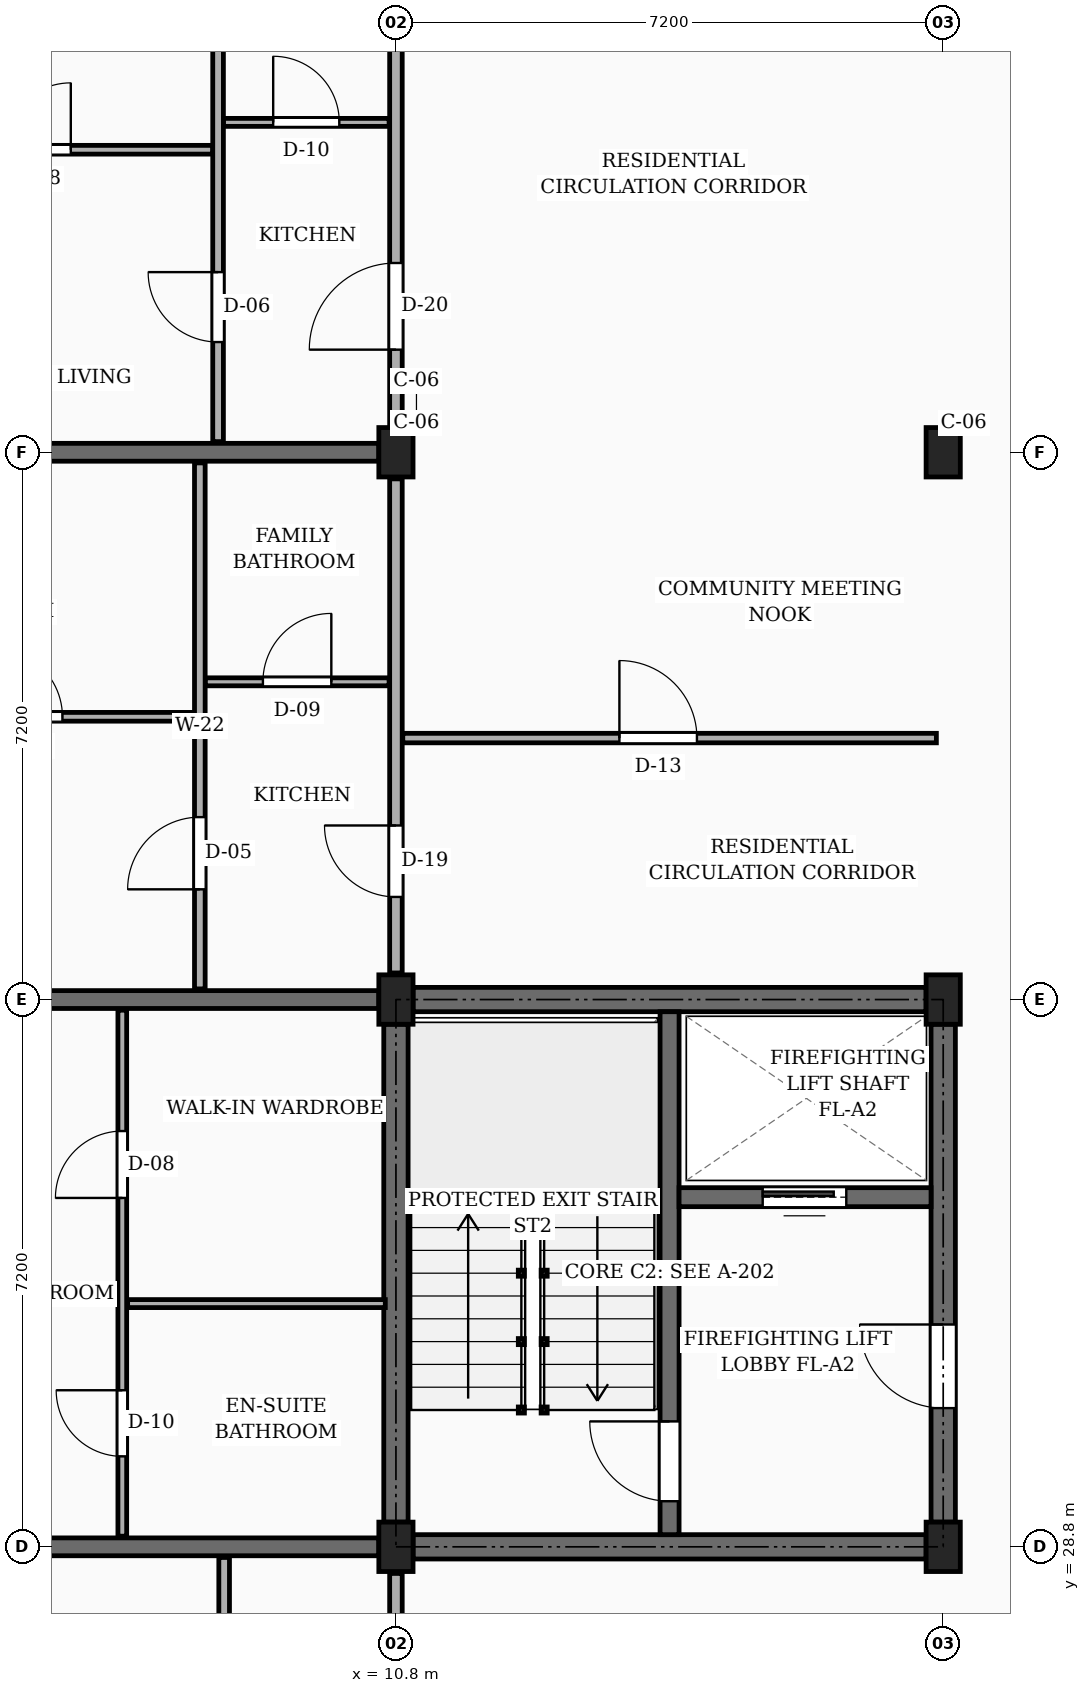
"""IFC4 building model, lengths in metres.
Left out: names, types, materials, properties, quantities, classifications, styles, units other than length and angle.
Written with IfcOpenShell. Run it as: python <this file> out.ifc"""

import sys

from ifc_helpers import new_model, si_unit, direction, frame, frame_2d, origin, origin_2d, place, context, subcontext, project, spatial, rectangle, extrude, element, fill, save


model = new_model("IFC4")
c1 = context("Model", 3, precision=1e-05, world=origin(), true_north=direction((0.0, 1.0)))
c2 = subcontext(c1, "Body", "Model", "MODEL_VIEW")
j1 = project(units=[si_unit("LENGTHUNIT", "METRE"), si_unit("PLANEANGLEUNIT", "RADIAN")], contexts=[c1])
p1 = place(None, origin())
s1 = spatial("IfcSite", under=j1, at=p1, CompositionType="ELEMENT")
p2 = place(p1, origin())
s2 = spatial("IfcBuilding", under=s1, at=p2, CompositionType="ELEMENT")
p3 = place(p2, frame((0.0, 0.0, 13.95)))
s3 = spatial("IfcBuildingStorey", under=s2, at=p3, CompositionType="ELEMENT", Elevation=13.95)
for number, where, z_axis, x_axis in (
    (1, (10.8, 28.8, 0.0), (0.0, 0.0, 1.0), (1.0, 0.0, 0.0)),
    (2, (10.8, 36.0, 0.0), (0.0, 0.0, 1.0), (1.0, 0.0, 0.0)),
    (3, (10.8, 43.2, 0.0), (0.0, 0.0, 1.0), (1.0, 0.0, 0.0)),
    (4, (18.0, 28.8, 0.0), (0.0, 0.0, 1.0), (1.0, 0.0, 0.0)),
    (5, (18.0, 36.0, 0.0), (0.0, 0.0, 1.0), (1.0, 0.0, 0.0)),
    (6, (18.0, 43.2, 0.0), (0.0, 0.0, 1.0), (1.0, 0.0, 0.0)),
):
    element("IfcColumn", number, at=place(p3, frame(where, z_axis=z_axis, x_axis=x_axis)), inside=s3, PredefinedType="COLUMN", context=c2, shape_type="SweptSolid", body=[
        extrude(rectangle(XDim=0.45, YDim=0.65, at=origin_2d()), origin(), (0.0, 0.0, 1.0), 3.15),
    ])
p4 = place(p3, frame((3.875, 28.8, 0.0), z_axis=(0.0, 0.0, 1.0), x_axis=(1.0, 0.0, 0.0)))
e7 = element("IfcWall", 7, at=p4, inside=s3, PredefinedType="SOLIDWALL", context=c2, shape_type="SweptSolid", body=[
    extrude(rectangle(XDim=6.7, YDim=0.235, at=frame_2d((3.35, 0.0))), origin(), (0.0, 0.0, 1.0), 2.17),
])
p5 = place(p4, frame((1.35, 0.0, 0.0)))
e8 = element("IfcOpeningElement", 8, at=p5, cuts=e7, PredefinedType="OPENING", context=c2, shape_type="SweptSolid", body=[
    extrude(rectangle(XDim=0.98, YDim=2.12, at=frame_2d((0.49, 1.06))), frame((0.0, 0.127, 0.0), z_axis=(0.0, -1.0, 0.0), x_axis=(1.0, 0.0, 0.0)), (0.0, 0.0, 1.0), 0.255),
])
for number, where, z_axis, x_axis in (
    (9, (3.875, 36.0, 0.0), (0.0, 0.0, 1.0), (1.0, 0.0, 0.0)),
    (10, (3.875, 43.2, 0.0), (0.0, 0.0, 1.0), (1.0, 0.0, 0.0)),
):
    element("IfcWall", number, at=place(p3, frame(where, z_axis=z_axis, x_axis=x_axis)), inside=s3, PredefinedType="SOLIDWALL", context=c2, shape_type="SweptSolid", body=[
        extrude(rectangle(XDim=6.7, YDim=0.235, at=frame_2d((3.35, 0.0))), origin(), (0.0, 0.0, 1.0), 2.17),
    ])
p6 = place(p3, frame((10.8, 29.125, 0.0), z_axis=(0.0, 0.0, 1.0), x_axis=(0.0, 1.0, 0.0)))
e11 = element("IfcWall", 11, at=p6, inside=s3, PredefinedType="SHEAR", context=c2, shape_type="SweptSolid", body=[
    extrude(rectangle(XDim=6.55, YDim=0.32, at=frame_2d((3.275, 0.0))), origin(), (0.0, 0.0, 1.0), 2.87),
])
p7 = place(p3, frame((11.025, 36.0, 0.0), z_axis=(0.0, 0.0, 1.0), x_axis=(1.0, 0.0, 0.0)))
e12 = element("IfcWall", 12, at=p7, inside=s3, PredefinedType="SHEAR", context=c2, shape_type="SweptSolid", body=[
    extrude(rectangle(XDim=6.75, YDim=0.32, at=frame_2d((3.375, 0.0))), origin(), (0.0, 0.0, 1.0), 2.87),
])
p8 = place(p3, frame((18.0, 29.125, 0.0), z_axis=(0.0, 0.0, 1.0), x_axis=(0.0, 1.0, 0.0)))
e13 = element("IfcWall", 13, at=p8, inside=s3, PredefinedType="SHEAR", context=c2, shape_type="SweptSolid", body=[
    extrude(rectangle(XDim=6.55, YDim=0.32, at=frame_2d((3.275, 0.0))), origin(), (0.0, 0.0, 1.0), 2.87),
])
p9 = place(p8, frame((1.5, 0.0, 0.0)))
e14 = element("IfcOpeningElement", 14, at=p9, cuts=e13, PredefinedType="OPENING", context=c2, shape_type="SweptSolid", body=[
    extrude(rectangle(XDim=1.1, YDim=2.15, at=frame_2d((0.55, 1.075))), frame((0.0, 0.17, 0.0), z_axis=(0.0, -1.0, 0.0), x_axis=(1.0, 0.0, 0.0)), (0.0, 0.0, 1.0), 0.34),
])
p10 = place(p3, frame((11.025, 28.8, 0.0), z_axis=(0.0, 0.0, 1.0), x_axis=(1.0, 0.0, 0.0)))
e15 = element("IfcWall", 15, at=p10, inside=s3, PredefinedType="SHEAR", context=c2, shape_type="SweptSolid", body=[
    extrude(rectangle(XDim=6.75, YDim=0.32, at=frame_2d((3.375, 0.0))), origin(), (0.0, 0.0, 1.0), 2.87),
])
p11 = place(p3, frame((14.4, 28.96, 0.0), z_axis=(0.0, 0.0, 1.0), x_axis=(0.0, 1.0, 0.0)))
e16 = element("IfcWall", 16, at=p11, inside=s3, PredefinedType="SHEAR", context=c2, shape_type="SweptSolid", body=[
    extrude(rectangle(XDim=6.88, YDim=0.25, at=frame_2d((3.44, 0.0))), origin(), (0.0, 0.0, 1.0), 2.87),
])
p12 = place(p11, frame((0.44, 0.0, 0.0)))
e17 = element("IfcOpeningElement", 17, at=p12, cuts=e16, PredefinedType="OPENING", context=c2, shape_type="SweptSolid", body=[
    extrude(rectangle(XDim=1.05, YDim=2.15, at=frame_2d((0.525, 1.075))), frame((0.0, 0.135, 0.0), z_axis=(0.0, -1.0, 0.0), x_axis=(1.0, 0.0, 0.0)), (0.0, 0.0, 1.0), 0.27),
])
p13 = place(p3, frame((14.525, 33.4, 0.0), z_axis=(0.0, 0.0, 1.0), x_axis=(1.0, 0.0, 0.0)))
e18 = element("IfcWall", 18, at=p13, inside=s3, PredefinedType="SHEAR", context=c2, shape_type="SweptSolid", body=[
    extrude(rectangle(XDim=3.315, YDim=0.25, at=frame_2d((1.658, 0.0))), origin(), (0.0, 0.0, 1.0), 2.87),
])
p14 = place(p13, frame((1.1, 0.0, 0.0)))
e19 = element("IfcOpeningElement", 19, at=p14, cuts=e18, PredefinedType="OPENING", context=c2, shape_type="SweptSolid", body=[
    extrude(rectangle(XDim=1.1, YDim=2.2, at=frame_2d((0.55, 1.1))), frame((0.0, 0.135, 0.0), z_axis=(0.0, -1.0, 0.0), x_axis=(1.0, 0.0, 0.0)), (0.0, 0.0, 1.0), 0.27),
])
p15 = place(p3, frame((10.8, 21.95, 0.0), z_axis=(0.0, 0.0, 1.0), x_axis=(0.0, 1.0, 0.0)))
e20 = element("IfcWall", 20, at=p15, inside=s3, PredefinedType="PARTITIONING", context=c2, shape_type="SweptSolid", body=[
    extrude(rectangle(XDim=6.5, YDim=0.165, at=frame_2d((3.25, 0.0))), origin(), (0.0, 0.0, 1.0), 2.305),
])
p16 = place(p15, frame((1.0, 0.0, 0.0)))
e21 = element("IfcOpeningElement", 21, at=p16, cuts=e20, PredefinedType="OPENING", context=c2, shape_type="SweptSolid", body=[
    extrude(rectangle(XDim=1.0, YDim=2.15, at=frame_2d((0.5, 1.075))), frame((0.0, 0.093, 0.0), z_axis=(0.0, -1.0, 0.0), x_axis=(1.0, 0.0, 0.0)), (0.0, 0.0, 1.0), 0.185),
])
p17 = place(p3, frame((10.8, 36.35, 0.0), z_axis=(0.0, 0.0, 1.0), x_axis=(0.0, 1.0, 0.0)))
e22 = element("IfcWall", 22, at=p17, inside=s3, PredefinedType="PARTITIONING", context=c2, shape_type="SweptSolid", body=[
    extrude(rectangle(XDim=6.5, YDim=0.165, at=frame_2d((3.25, 0.0))), origin(), (0.0, 0.0, 1.0), 2.305),
])
p18 = place(p17, frame((1.0, 0.0, 0.0)))
e23 = element("IfcOpeningElement", 23, at=p18, cuts=e22, PredefinedType="OPENING", context=c2, shape_type="SweptSolid", body=[
    extrude(rectangle(XDim=0.94, YDim=2.12, at=frame_2d((0.47, 1.06))), frame((0.0, 0.093, 0.0), z_axis=(0.0, -1.0, 0.0), x_axis=(1.0, 0.0, 0.0)), (0.0, 0.0, 1.0), 0.185),
])
p19 = place(p3, frame((10.8, 43.55, 0.0), z_axis=(0.0, 0.0, 1.0), x_axis=(0.0, 1.0, 0.0)))
e24 = element("IfcWall", 24, at=p19, inside=s3, PredefinedType="PARTITIONING", context=c2, shape_type="SweptSolid", body=[
    extrude(rectangle(XDim=6.5, YDim=0.165, at=frame_2d((3.25, 0.0))), origin(), (0.0, 0.0, 1.0), 2.305),
])
p20 = place(p19, frame((1.0, 0.0, 0.0)))
e25 = element("IfcOpeningElement", 25, at=p20, cuts=e24, PredefinedType="OPENING", context=c2, shape_type="SweptSolid", body=[
    extrude(rectangle(XDim=1.14, YDim=2.18, at=frame_2d((0.57, 1.09))), frame((0.0, 0.093, 0.0), z_axis=(0.0, -1.0, 0.0), x_axis=(1.0, 0.0, 0.0)), (0.0, 0.0, 1.0), 0.185),
])
p21 = place(p3, frame((8.54, 21.74, 0.0), z_axis=(0.0, 0.0, 1.0), x_axis=(0.0, 1.0, 0.0)))
e26 = element("IfcWall", 26, at=p21, inside=s3, PredefinedType="PARTITIONING", context=c2, shape_type="SweptSolid", body=[
    extrude(rectangle(XDim=6.92, YDim=0.14, at=frame_2d((3.46, 0.0))), origin(), (0.0, 0.0, 1.0), 2.305),
])
p22 = place(p21, frame((1.31, 0.0, 0.0)))
e27 = element("IfcOpeningElement", 27, at=p22, cuts=e26, PredefinedType="OPENING", context=c2, shape_type="SweptSolid", body=[
    extrude(rectangle(XDim=0.95, YDim=2.1, at=frame_2d((0.475, 1.05))), frame((0.0, 0.08, 0.0), z_axis=(0.0, -1.0, 0.0), x_axis=(1.0, 0.0, 0.0)), (0.0, 0.0, 1.0), 0.16),
])
p23 = place(p3, frame((7.2, 28.94, 0.0), z_axis=(0.0, 0.0, 1.0), x_axis=(0.0, 1.0, 0.0)))
e28 = element("IfcWall", 28, at=p23, inside=s3, PredefinedType="PARTITIONING", context=c2, shape_type="SweptSolid", body=[
    extrude(rectangle(XDim=6.92, YDim=0.115, at=frame_2d((3.46, 0.0))), origin(), (0.0, 0.0, 1.0), 2.305),
])
p24 = place(p23, frame((1.05, 0.0, 0.0)))
e29 = element("IfcOpeningElement", 29, at=p24, cuts=e28, PredefinedType="OPENING", context=c2, shape_type="SweptSolid", body=[
    extrude(rectangle(XDim=0.87, YDim=2.05, at=frame_2d((0.435, 1.025))), frame((0.0, 0.067, 0.0), z_axis=(0.0, -1.0, 0.0), x_axis=(1.0, 0.0, 0.0)), (0.0, 0.0, 1.0), 0.135),
])
p25 = place(p23, frame((4.45, 0.0, 0.0)))
e30 = element("IfcOpeningElement", 30, at=p25, cuts=e28, PredefinedType="OPENING", context=c2, shape_type="SweptSolid", body=[
    extrude(rectangle(XDim=0.88, YDim=2.08, at=frame_2d((0.44, 1.04))), frame((0.0, 0.067, 0.0), z_axis=(0.0, -1.0, 0.0), x_axis=(1.0, 0.0, 0.0)), (0.0, 0.0, 1.0), 0.135),
])
p26 = place(p3, frame((7.27, 32.0, 0.0), z_axis=(0.0, 0.0, 1.0), x_axis=(1.0, 0.0, 0.0)))
e31 = element("IfcWall", 31, at=p26, inside=s3, PredefinedType="PARTITIONING", context=c2, shape_type="SweptSolid", body=[
    extrude(rectangle(XDim=3.39, YDim=0.105, at=frame_2d((1.695, 0.0))), origin(), (0.0, 0.0, 1.0), 2.305),
])
p27 = place(p3, frame((10.89, 39.44, 0.0), z_axis=(0.0, 0.0, 1.0), x_axis=(1.0, 0.0, 0.0)))
e32 = element("IfcWall", 32, at=p27, inside=s3, PredefinedType="PARTITIONING", context=c2, shape_type="SweptSolid", body=[
    extrude(rectangle(XDim=7.02, YDim=0.125, at=frame_2d((3.51, 0.0))), origin(), (0.0, 0.0, 1.0), 2.305),
])
p28 = place(p27, frame((2.85, 0.0, 0.0)))
e33 = element("IfcOpeningElement", 33, at=p28, cuts=e32, PredefinedType="OPENING", context=c2, shape_type="SweptSolid", body=[
    extrude(rectangle(XDim=1.02, YDim=2.15, at=frame_2d((0.51, 1.075))), frame((0.0, 0.073, 0.0), z_axis=(0.0, -1.0, 0.0), x_axis=(1.0, 0.0, 0.0)), (0.0, 0.0, 1.0), 0.145),
])
p29 = place(p3, frame((3.775, 39.72, 0.0), z_axis=(0.0, 0.0, 1.0), x_axis=(1.0, 0.0, 0.0)))
e34 = element("IfcWall", 34, at=p29, inside=s3, PredefinedType="PARTITIONING", context=c2, shape_type="SweptSolid", body=[
    extrude(rectangle(XDim=4.375, YDim=0.115, at=frame_2d((2.188, 0.0))), origin(), (0.0, 0.0, 1.0), 2.305),
])
p30 = place(p29, frame((1.738, 0.0, 0.0)))
e35 = element("IfcOpeningElement", 35, at=p30, cuts=e34, PredefinedType="OPENING", context=c2, shape_type="SweptSolid", body=[
    extrude(rectangle(XDim=0.9, YDim=2.1, at=frame_2d((0.45, 1.05))), frame((0.0, 0.067, 0.0), z_axis=(0.0, -1.0, 0.0), x_axis=(1.0, 0.0, 0.0)), (0.0, 0.0, 1.0), 0.135),
])
p31 = place(p3, frame((8.29, 40.18, 0.0), z_axis=(0.0, 0.0, 1.0), x_axis=(1.0, 0.0, 0.0)))
e36 = element("IfcWall", 36, at=p31, inside=s3, PredefinedType="PARTITIONING", context=c2, shape_type="SweptSolid", body=[
    extrude(rectangle(XDim=2.42, YDim=0.105, at=frame_2d((1.21, 0.0))), origin(), (0.0, 0.0, 1.0), 2.305),
])
p32 = place(p31, frame((0.76, 0.0, 0.0)))
e37 = element("IfcOpeningElement", 37, at=p32, cuts=e36, PredefinedType="OPENING", context=c2, shape_type="SweptSolid", body=[
    extrude(rectangle(XDim=0.9, YDim=2.05, at=frame_2d((0.45, 1.025))), frame((0.0, 0.062, 0.0), z_axis=(0.0, -1.0, 0.0), x_axis=(1.0, 0.0, 0.0)), (0.0, 0.0, 1.0), 0.125),
])
p33 = place(p3, frame((8.22, 36.14, 0.0), z_axis=(0.0, 0.0, 1.0), x_axis=(0.0, 1.0, 0.0)))
e38 = element("IfcWall", 38, at=p33, inside=s3, PredefinedType="PARTITIONING", context=c2, shape_type="SweptSolid", body=[
    extrude(rectangle(XDim=6.92, YDim=0.14, at=frame_2d((3.46, 0.0))), origin(), (0.0, 0.0, 1.0), 2.305),
])
p34 = place(p33, frame((1.31, 0.0, 0.0)))
e39 = element("IfcOpeningElement", 39, at=p34, cuts=e38, PredefinedType="OPENING", context=c2, shape_type="SweptSolid", body=[
    extrude(rectangle(XDim=0.95, YDim=2.1, at=frame_2d((0.475, 1.05))), frame((0.0, 0.08, 0.0), z_axis=(0.0, -1.0, 0.0), x_axis=(1.0, 0.0, 0.0)), (0.0, 0.0, 1.0), 0.16),
])
p35 = place(p3, frame((3.775, 47.18, 0.0), z_axis=(0.0, 0.0, 1.0), x_axis=(1.0, 0.0, 0.0)))
e40 = element("IfcWall", 40, at=p35, inside=s3, PredefinedType="PARTITIONING", context=c2, shape_type="SweptSolid", body=[
    extrude(rectangle(XDim=4.615, YDim=0.115, at=frame_2d((2.308, 0.0))), origin(), (0.0, 0.0, 1.0), 2.305),
])
p36 = place(p35, frame((1.867, 0.0, 0.0)))
e41 = element("IfcOpeningElement", 41, at=p36, cuts=e40, PredefinedType="OPENING", context=c2, shape_type="SweptSolid", body=[
    extrude(rectangle(XDim=0.88, YDim=2.08, at=frame_2d((0.44, 1.04))), frame((0.0, 0.067, 0.0), z_axis=(0.0, -1.0, 0.0), x_axis=(1.0, 0.0, 0.0)), (0.0, 0.0, 1.0), 0.135),
])
p37 = place(p3, frame((8.53, 47.54, 0.0), z_axis=(0.0, 0.0, 1.0), x_axis=(1.0, 0.0, 0.0)))
e42 = element("IfcWall", 42, at=p37, inside=s3, PredefinedType="PARTITIONING", context=c2, shape_type="SweptSolid", body=[
    extrude(rectangle(XDim=2.18, YDim=0.105, at=frame_2d((1.09, 0.0))), origin(), (0.0, 0.0, 1.0), 2.305),
])
p38 = place(p37, frame((0.655, 0.0, 0.0)))
e43 = element("IfcOpeningElement", 43, at=p38, cuts=e42, PredefinedType="OPENING", context=c2, shape_type="SweptSolid", body=[
    extrude(rectangle(XDim=0.87, YDim=2.05, at=frame_2d((0.435, 1.025))), frame((0.0, 0.062, 0.0), z_axis=(0.0, -1.0, 0.0), x_axis=(1.0, 0.0, 0.0)), (0.0, 0.0, 1.0), 0.125),
])
p39 = place(p3, frame((8.46, 43.34, 0.0), z_axis=(0.0, 0.0, 1.0), x_axis=(0.0, 1.0, 0.0)))
e44 = element("IfcWall", 44, at=p39, inside=s3, PredefinedType="PARTITIONING", context=c2, shape_type="SweptSolid", body=[
    extrude(rectangle(XDim=6.885, YDim=0.14, at=frame_2d((3.442, 0.0))), origin(), (0.0, 0.0, 1.0), 2.305),
])
p40 = place(p39, frame((1.31, 0.0, 0.0)))
e45 = element("IfcOpeningElement", 45, at=p40, cuts=e44, PredefinedType="OPENING", context=c2, shape_type="SweptSolid", body=[
    extrude(rectangle(XDim=0.92, YDim=2.1, at=frame_2d((0.46, 1.05))), frame((0.0, 0.08, 0.0), z_axis=(0.0, -1.0, 0.0), x_axis=(1.0, 0.0, 0.0)), (0.0, 0.0, 1.0), 0.16),
])
p41 = place(p9, frame((1.1, 0.0, 0.0), z_axis=(0.0, 0.0, 1.0), x_axis=(-1.0, 0.0, 0.0)))
e46 = element("IfcDoor", 46, at=p41, inside=s3, OperationType="SINGLE_SWING_RIGHT", PredefinedType="DOOR", context=c2, shape_type="SweptSolid", body=[
    extrude(rectangle(XDim=1.1, YDim=2.15, at=frame_2d((0.55, 1.075))), frame((0.0, 0.025, 0.0), z_axis=(0.0, -1.0, 0.0), x_axis=(1.0, 0.0, 0.0)), (0.0, 0.0, 1.0), 0.05),
])
fill(e14, e46)
p42 = place(p12, origin())
e47 = element("IfcDoor", 47, at=p42, inside=s3, OperationType="SINGLE_SWING_RIGHT", PredefinedType="DOOR", context=c2, shape_type="SweptSolid", body=[
    extrude(rectangle(XDim=1.05, YDim=2.15, at=frame_2d((0.525, 1.075))), frame((0.0, 0.025, 0.0), z_axis=(0.0, -1.0, 0.0), x_axis=(1.0, 0.0, 0.0)), (0.0, 0.0, 1.0), 0.05),
])
fill(e17, e47)
p43 = place(p14, origin())
e48 = element("IfcDoor", 48, at=p43, inside=s3, OperationType="SLIDING_TO_LEFT", PredefinedType="DOOR", context=c2, shape_type="SweptSolid", body=[
    extrude(rectangle(XDim=1.1, YDim=2.2, at=frame_2d((0.55, 1.1))), frame((0.0, 0.025, 0.0), z_axis=(0.0, -1.0, 0.0), x_axis=(1.0, 0.0, 0.0)), (0.0, 0.0, 1.0), 0.05),
])
fill(e19, e48)
p44 = place(p18, origin())
e49 = element("IfcDoor", 49, at=p44, inside=s3, OperationType="SINGLE_SWING_RIGHT", PredefinedType="DOOR", context=c2, shape_type="SweptSolid", body=[
    extrude(rectangle(XDim=0.94, YDim=2.12, at=frame_2d((0.47, 1.06))), frame((0.0, 0.025, 0.0), z_axis=(0.0, -1.0, 0.0), x_axis=(1.0, 0.0, 0.0)), (0.0, 0.0, 1.0), 0.05),
])
fill(e23, e49)
p45 = place(p20, origin())
e50 = element("IfcDoor", 50, at=p45, inside=s3, OperationType="SINGLE_SWING_LEFT", PredefinedType="DOOR", context=c2, shape_type="SweptSolid", body=[
    extrude(rectangle(XDim=1.14, YDim=2.18, at=frame_2d((0.57, 1.09))), frame((0.0, 0.025, 0.0), z_axis=(0.0, -1.0, 0.0), x_axis=(1.0, 0.0, 0.0)), (0.0, 0.0, 1.0), 0.05),
])
fill(e25, e50)
p46 = place(p24, origin())
e51 = element("IfcDoor", 51, at=p46, inside=s3, OperationType="SINGLE_SWING_RIGHT", PredefinedType="DOOR", context=c2, shape_type="SweptSolid", body=[
    extrude(rectangle(XDim=0.87, YDim=2.05, at=frame_2d((0.435, 1.025))), frame((0.0, 0.025, 0.0), z_axis=(0.0, -1.0, 0.0), x_axis=(1.0, 0.0, 0.0)), (0.0, 0.0, 1.0), 0.05),
])
fill(e29, e51)
p47 = place(p25, origin())
e52 = element("IfcDoor", 52, at=p47, inside=s3, OperationType="SINGLE_SWING_LEFT", PredefinedType="DOOR", context=c2, shape_type="SweptSolid", body=[
    extrude(rectangle(XDim=0.88, YDim=2.08, at=frame_2d((0.44, 1.04))), frame((0.0, 0.025, 0.0), z_axis=(0.0, -1.0, 0.0), x_axis=(1.0, 0.0, 0.0)), (0.0, 0.0, 1.0), 0.05),
])
fill(e30, e52)
p48 = place(p28, origin())
e53 = element("IfcDoor", 53, at=p48, inside=s3, OperationType="SINGLE_SWING_LEFT", PredefinedType="DOOR", context=c2, shape_type="SweptSolid", body=[
    extrude(rectangle(XDim=1.02, YDim=2.15, at=frame_2d((0.51, 1.075))), frame((0.0, 0.025, 0.0), z_axis=(0.0, -1.0, 0.0), x_axis=(1.0, 0.0, 0.0)), (0.0, 0.0, 1.0), 0.05),
])
fill(e33, e53)
p49 = place(p30, origin())
e54 = element("IfcDoor", 54, at=p49, inside=s3, OperationType="SINGLE_SWING_LEFT", PredefinedType="DOOR", context=c2, shape_type="SweptSolid", body=[
    extrude(rectangle(XDim=0.9, YDim=2.1, at=frame_2d((0.45, 1.05))), frame((0.0, 0.025, 0.0), z_axis=(0.0, -1.0, 0.0), x_axis=(1.0, 0.0, 0.0)), (0.0, 0.0, 1.0), 0.05),
])
fill(e35, e54)
p50 = place(p32, origin())
e55 = element("IfcDoor", 55, at=p50, inside=s3, OperationType="SINGLE_SWING_RIGHT", PredefinedType="DOOR", context=c2, shape_type="SweptSolid", body=[
    extrude(rectangle(XDim=0.9, YDim=2.05, at=frame_2d((0.45, 1.025))), frame((0.0, 0.025, 0.0), z_axis=(0.0, -1.0, 0.0), x_axis=(1.0, 0.0, 0.0)), (0.0, 0.0, 1.0), 0.05),
])
fill(e37, e55)
p51 = place(p34, origin())
e56 = element("IfcDoor", 56, at=p51, inside=s3, OperationType="SINGLE_SWING_LEFT", PredefinedType="DOOR", context=c2, shape_type="SweptSolid", body=[
    extrude(rectangle(XDim=0.95, YDim=2.1, at=frame_2d((0.475, 1.05))), frame((0.0, 0.025, 0.0), z_axis=(0.0, -1.0, 0.0), x_axis=(1.0, 0.0, 0.0)), (0.0, 0.0, 1.0), 0.05),
])
fill(e39, e56)
p52 = place(p36, origin())
e57 = element("IfcDoor", 57, at=p52, inside=s3, OperationType="SINGLE_SWING_RIGHT", PredefinedType="DOOR", context=c2, shape_type="SweptSolid", body=[
    extrude(rectangle(XDim=0.88, YDim=2.08, at=frame_2d((0.44, 1.04))), frame((0.0, 0.025, 0.0), z_axis=(0.0, -1.0, 0.0), x_axis=(1.0, 0.0, 0.0)), (0.0, 0.0, 1.0), 0.05),
])
fill(e41, e57)
p53 = place(p38, origin())
e58 = element("IfcDoor", 58, at=p53, inside=s3, OperationType="SINGLE_SWING_LEFT", PredefinedType="DOOR", context=c2, shape_type="SweptSolid", body=[
    extrude(rectangle(XDim=0.87, YDim=2.05, at=frame_2d((0.435, 1.025))), frame((0.0, 0.025, 0.0), z_axis=(0.0, -1.0, 0.0), x_axis=(1.0, 0.0, 0.0)), (0.0, 0.0, 1.0), 0.05),
])
fill(e43, e58)
p54 = place(p40, origin())
e59 = element("IfcDoor", 59, at=p54, inside=s3, OperationType="SINGLE_SWING_RIGHT", PredefinedType="DOOR", context=c2, shape_type="SweptSolid", body=[
    extrude(rectangle(XDim=0.92, YDim=2.1, at=frame_2d((0.46, 1.05))), frame((0.0, 0.025, 0.0), z_axis=(0.0, -1.0, 0.0), x_axis=(1.0, 0.0, 0.0)), (0.0, 0.0, 1.0), 0.05),
])
fill(e45, e59)
save(model, sys.argv[1])
